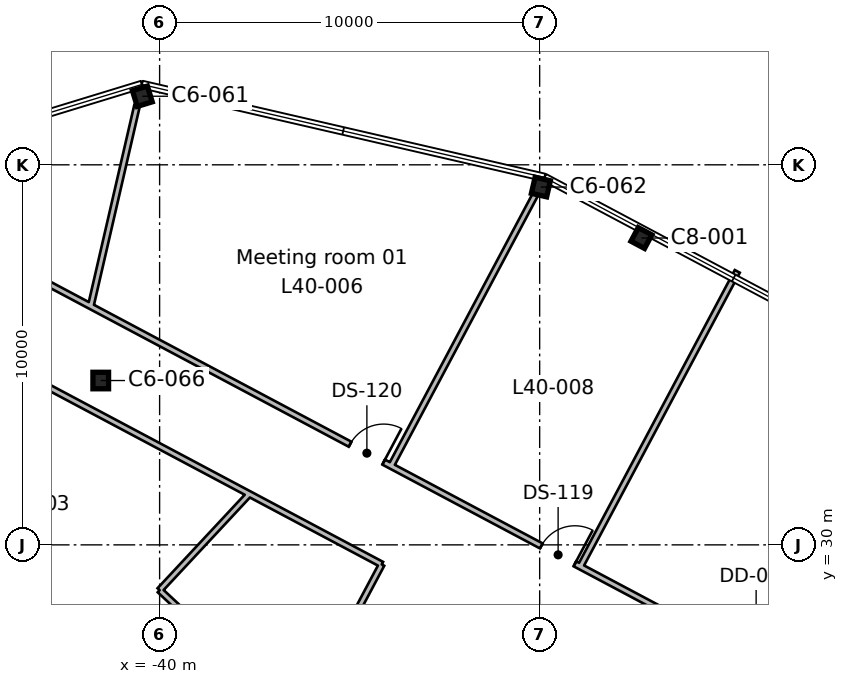
"""IFC4 building model, lengths in metres.
Left out: names, types, materials, properties, quantities, classifications, styles, units other than length and angle.
Written with IfcOpenShell. Run it as: python <this file> out.ifc"""

import sys

from ifc_helpers import new_model, si_unit, direction, frame, frame_2d, origin, origin_2d, place, context, subcontext, project, spatial, rectangle, i_section, extrude, element, fill, save


model = new_model("IFC4")
c1 = context("Model", 3, precision=1e-05, world=origin(), true_north=direction((0.0, 1.0)))
c2 = subcontext(c1, "Body", "Model", "MODEL_VIEW")
j1 = project(units=[si_unit("LENGTHUNIT", "METRE"), si_unit("PLANEANGLEUNIT", "RADIAN")], contexts=[c1])
p1 = place(None, origin())
s1 = spatial("IfcSite", under=j1, at=p1, CompositionType="ELEMENT")
p2 = place(p1, origin())
s2 = spatial("IfcBuilding", under=s1, at=p2, CompositionType="ELEMENT")
p3 = place(p2, frame((0.0, 0.0, 189.6)))
s3 = spatial("IfcBuildingStorey", under=s2, at=p3, CompositionType="ELEMENT", Elevation=189.6)
p4 = place(p3, frame((-41.549, 34.324, 0.0), z_axis=(0.0, 0.0, 1.0), x_axis=(1.0, 0.0, 0.0)))
e1 = element("IfcColumn", 1, at=p4, inside=s3, PredefinedType="COLUMN", context=c2, shape_type="SweptSolid", body=[
    extrude(i_section(OverallWidth=0.412, OverallDepth=0.434, WebThickness=0.036, FlangeThickness=0.057, FilletRadius=0.015, at=origin_2d()), origin(), (0.0, 0.0, 1.0), 3.9),
])
p5 = place(p3, frame((-27.323, 38.074, 0.0), z_axis=(0.0, 0.0, 1.0), x_axis=(-0.882947592859, 0.469471562786, 0.0)))
e2 = element("IfcColumn", 2, at=p5, inside=s3, PredefinedType="COLUMN", context=c2, shape_type="SweptSolid", body=[
    extrude(i_section(OverallWidth=0.404, OverallDepth=0.406, WebThickness=0.027, FlangeThickness=0.044, FilletRadius=0.015, at=origin_2d()), origin(), (0.0, 0.0, 1.0), 3.9),
])
for number, where, z_axis, x_axis in (
    (3, (-29.968, 39.415, 0.0), (0.0, 0.0, 1.0), (-0.974, 0.225, 0.0)),
    (4, (-40.455, 41.804, 0.0), (0.0, 0.0, 1.0), (-0.956, -0.292, 0.0)),
):
    element("IfcColumn", number, at=place(p3, frame(where, z_axis=z_axis, x_axis=x_axis)), inside=s3, PredefinedType="COLUMN", context=c2, shape_type="SweptSolid", body=[
        extrude(i_section(OverallWidth=0.412, OverallDepth=0.434, WebThickness=0.036, FlangeThickness=0.057, FilletRadius=0.015, at=origin_2d()), origin(), (0.0, 0.0, 1.0), 3.9),
    ])
p6 = place(p3, frame((-54.714, 35.096, 0.0), z_axis=(0.0, 0.0, 1.0), x_axis=(0.731373223971, -0.681977424303, 0.0)))
e5 = element("IfcWall", 5, at=p6, inside=s3, PredefinedType="PARTITIONING", context=c2, shape_type="SweptSolid", body=[
    extrude(rectangle(XDim=21.52, YDim=0.15, at=frame_2d((10.76, 0.0))), origin(), (0.0, 0.0, 1.0), 3.54),
])
p7 = place(p3, frame((-41.617, 15.452, 0.0), z_axis=(0.0, 0.0, 1.0), x_axis=(-0.731394449571, 0.681954660617, 0.0)))
e6 = element("IfcWall", 6, at=p7, inside=s3, PredefinedType="PARTITIONING", context=c2, shape_type="SweptSolid", body=[
    extrude(rectangle(XDim=22.207, YDim=0.15, at=frame_2d((11.104, 0.0))), origin(), (0.0, 0.0, 1.0), 3.54),
])
p8 = place(p3, frame((-37.64, 31.339, 0.0), z_axis=(0.0, 0.0, 1.0), x_axis=(-0.681983873773, -0.731367210035, 0.0)))
e7 = element("IfcWall", 7, at=p8, inside=s3, PredefinedType="PARTITIONING", context=c2, shape_type="SweptSolid", body=[
    extrude(rectangle(XDim=3.461, YDim=0.15, at=frame_2d((1.73, 0.0))), origin(), (0.0, 0.0, 1.0), 3.54),
])
p9 = place(p3, frame((-40.0, 28.808, 0.0), z_axis=(0.0, 0.0, 1.0), x_axis=(0.731199369693, -0.682163823257, 0.0)))
e8 = element("IfcWall", 8, at=p9, inside=s3, PredefinedType="PARTITIONING", context=c2, shape_type="SweptSolid", body=[
    extrude(rectangle(XDim=5.014, YDim=0.15, at=frame_2d((2.507, 0.0))), origin(), (0.0, 0.0, 1.0), 3.54),
])
p10 = place(p3, frame((-41.618, 15.45, 0.0), z_axis=(0.0, 0.0, 1.0), x_axis=(0.46945912711, 0.882954204913, 0.0)))
e9 = element("IfcWall", 9, at=p10, inside=s3, PredefinedType="PARTITIONING", context=c2, shape_type="SweptSolid", body=[
    extrude(rectangle(XDim=15.897, YDim=0.15, at=frame_2d((7.948, 0.0))), origin(), (0.0, 0.0, 1.0), 3.54),
])
p11 = place(p10, frame((7.449, 0.0, 0.0)))
e10 = element("IfcOpeningElement", 10, at=p11, cuts=e9, PredefinedType="OPENING", context=c2, shape_type="SweptSolid", body=[
    extrude(rectangle(XDim=1.0, YDim=2.1, at=frame_2d((0.5, 1.05))), frame((0.0, 0.085, 0.0), z_axis=(0.0, -1.0, 0.0), x_axis=(1.0, 0.0, 0.0)), (0.0, 0.0, 1.0), 0.17),
])
p12 = place(p10, frame((4.45, 0.0, 0.0)))
e11 = element("IfcOpeningElement", 11, at=p12, cuts=e9, PredefinedType="OPENING", context=c2, shape_type="SweptSolid", body=[
    extrude(rectangle(XDim=1.0, YDim=2.1, at=frame_2d((0.5, 1.05))), frame((0.0, 0.085, 0.0), z_axis=(0.0, -1.0, 0.0), x_axis=(1.0, 0.0, 0.0)), (0.0, 0.0, 1.0), 0.17),
])
p13 = place(p3, frame((-34.155, 29.486, 0.0), z_axis=(0.0, 0.0, 1.0), x_axis=(-0.882941970897, 0.469482136006, 0.0)))
e12 = element("IfcWall", 12, at=p13, inside=s3, PredefinedType="PARTITIONING", context=c2, shape_type="SweptSolid", body=[
    extrude(rectangle(XDim=19.528, YDim=0.15, at=frame_2d((9.764, 0.0))), origin(), (0.0, 0.0, 1.0), 3.54),
])
p14 = place(p3, frame((-48.541, 39.854, 0.0), z_axis=(0.0, 0.0, 1.0), x_axis=(0.882945008423, -0.469476423372, 0.0)))
e13 = element("IfcWall", 13, at=p14, inside=s3, PredefinedType="PARTITIONING", context=c2, shape_type="SweptSolid", body=[
    extrude(rectangle(XDim=54.976, YDim=0.15, at=frame_2d((27.488, 0.0))), origin(), (0.0, 0.0, 1.0), 3.54),
])
p15 = place(p14, frame((26.55, 0.0, 0.0)))
e14 = element("IfcOpeningElement", 14, at=p15, cuts=e13, PredefinedType="OPENING", context=c2, shape_type="SweptSolid", body=[
    extrude(rectangle(XDim=1.8, YDim=2.1, at=frame_2d((0.9, 1.05))), frame((0.0, 0.085, 0.0), z_axis=(0.0, -1.0, 0.0), x_axis=(1.0, 0.0, 0.0)), (0.0, 0.0, 1.0), 0.17),
])
p16 = place(p14, frame((21.049, 0.0, 0.0)))
e15 = element("IfcOpeningElement", 15, at=p16, cuts=e13, PredefinedType="OPENING", context=c2, shape_type="SweptSolid", body=[
    extrude(rectangle(XDim=1.0, YDim=2.1, at=frame_2d((0.5, 1.05))), frame((0.0, 0.085, 0.0), z_axis=(0.0, -1.0, 0.0), x_axis=(1.0, 0.0, 0.0)), (0.0, 0.0, 1.0), 0.17),
])
p17 = place(p14, frame((15.35, 0.0, 0.0)))
e16 = element("IfcOpeningElement", 16, at=p17, cuts=e13, PredefinedType="OPENING", context=c2, shape_type="SweptSolid", body=[
    extrude(rectangle(XDim=1.0, YDim=2.1, at=frame_2d((0.5, 1.05))), frame((0.0, 0.085, 0.0), z_axis=(0.0, -1.0, 0.0), x_axis=(1.0, 0.0, 0.0)), (0.0, 0.0, 1.0), 0.17),
])
p18 = place(p3, frame((-30.109, 39.225, 0.0), z_axis=(0.0, 0.0, 1.0), x_axis=(-0.469490973279, -0.882937271843, 0.0)))
e17 = element("IfcWall", 17, at=p18, inside=s3, PredefinedType="PARTITIONING", context=c2, shape_type="SweptSolid", body=[
    extrude(rectangle(XDim=8.098, YDim=0.15, at=frame_2d((4.049, 0.0))), origin(), (0.0, 0.0, 1.0), 3.54),
])
p19 = place(p3, frame((-41.813, 36.276, 0.0), z_axis=(0.0, 0.0, 1.0), x_axis=(0.22495163737, 0.974369930183, 0.0)))
e18 = element("IfcWall", 18, at=p19, inside=s3, PredefinedType="PARTITIONING", context=c2, shape_type="SweptSolid", body=[
    extrude(rectangle(XDim=5.419, YDim=0.15, at=frame_2d((2.709, 0.0))), origin(), (0.0, 0.0, 1.0), 3.54),
])
p20 = place(p3, frame((-24.8, 37.197, 0.0), z_axis=(0.0, 0.0, 1.0), x_axis=(-0.469510830369, -0.882926712794, 0.0)))
e19 = element("IfcWall", 19, at=p20, inside=s3, PredefinedType="PARTITIONING", context=c2, shape_type="SweptSolid", body=[
    extrude(rectangle(XDim=8.8, YDim=0.15, at=frame_2d((4.4, 0.0))), origin(), (0.0, 0.0, 1.0), 3.54),
])
p21 = place(p16, origin())
e20 = element("IfcDoor", 20, at=p21, inside=s3, OperationType="SINGLE_SWING_RIGHT", PredefinedType="DOOR", context=c2, shape_type="SweptSolid", body=[
    extrude(rectangle(XDim=1.0, YDim=2.1, at=frame_2d((0.5, 1.05))), frame((0.0, 0.025, 0.0), z_axis=(0.0, -1.0, 0.0), x_axis=(1.0, 0.0, 0.0)), (0.0, 0.0, 1.0), 0.05),
])
fill(e15, e20)
p22 = place(p17, origin())
e21 = element("IfcDoor", 21, at=p22, inside=s3, OperationType="SINGLE_SWING_RIGHT", PredefinedType="DOOR", context=c2, shape_type="SweptSolid", body=[
    extrude(rectangle(XDim=1.0, YDim=2.1, at=frame_2d((0.5, 1.05))), frame((0.0, 0.025, 0.0), z_axis=(0.0, -1.0, 0.0), x_axis=(1.0, 0.0, 0.0)), (0.0, 0.0, 1.0), 0.05),
])
fill(e16, e21)
save(model, sys.argv[1])
